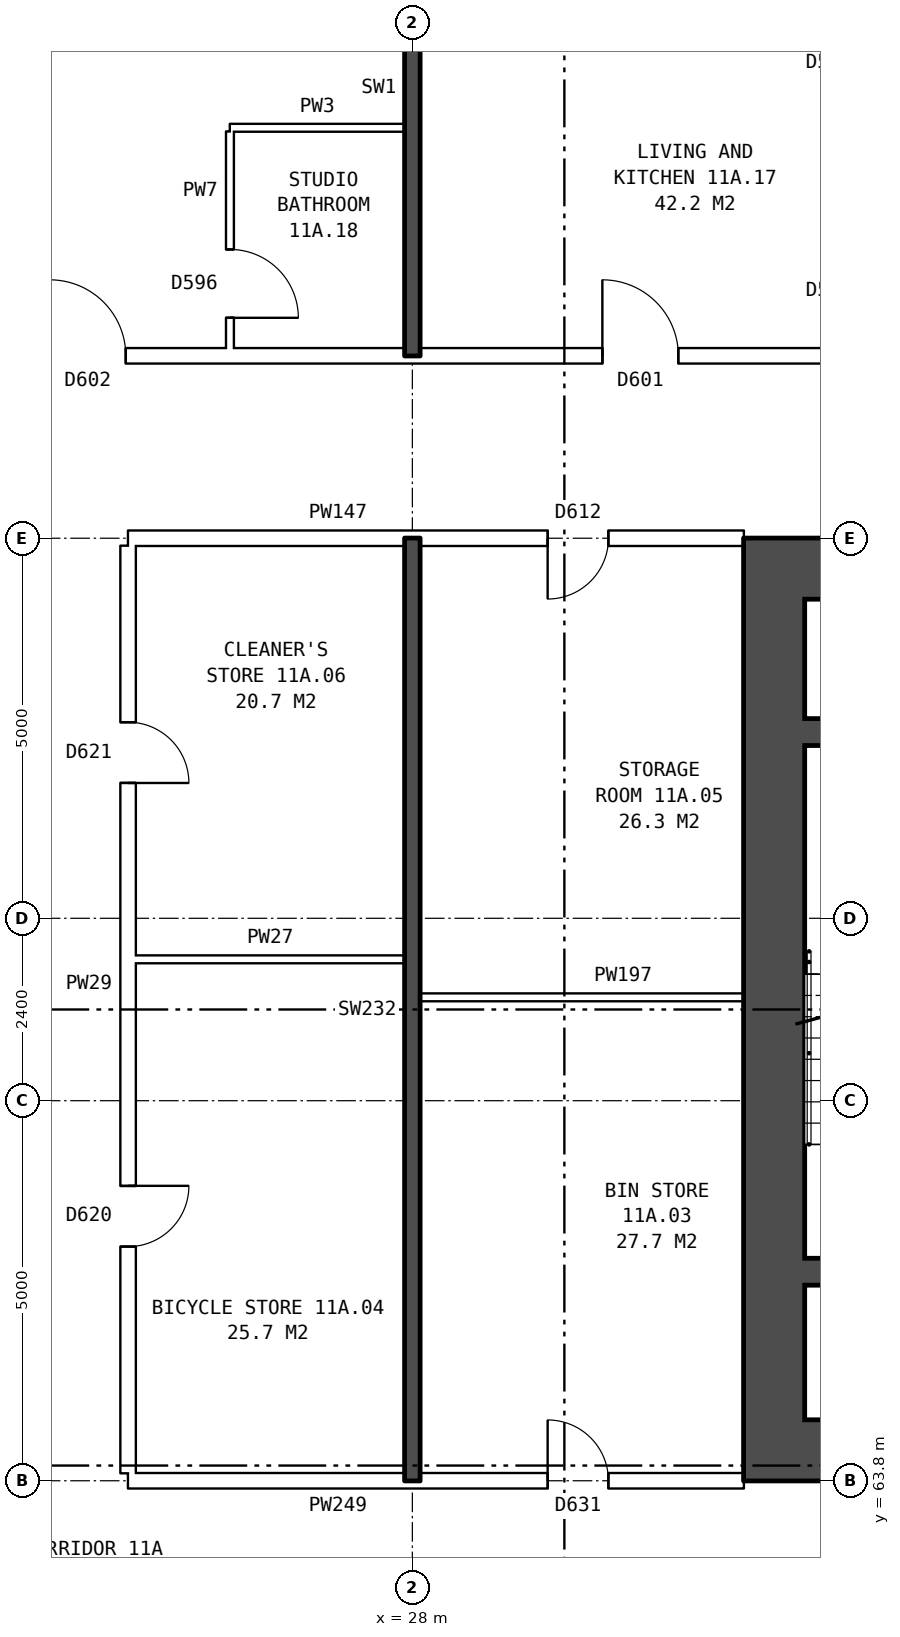
"""IFC4 building model, lengths in metres.
Left out: names, types, materials, properties, quantities, classifications, styles, units other than length and angle.
Written with IfcOpenShell. Run it as: python <this file> out.ifc"""

import sys

from ifc_helpers import new_model, si_unit, direction, frame, frame_2d, origin, place, context, subcontext, project, spatial, rectangle, extrude, element, fill, save


model = new_model("IFC4")
c1 = context("Model", 3, precision=1e-05, world=origin(), true_north=direction((0.0, 1.0)))
c2 = subcontext(c1, "Body", "Model", "MODEL_VIEW")
j1 = project(units=[si_unit("LENGTHUNIT", "METRE"), si_unit("PLANEANGLEUNIT", "RADIAN")], contexts=[c1])
p1 = place(None, origin())
s1 = spatial("IfcSite", under=j1, at=p1, CompositionType="ELEMENT")
p2 = place(p1, origin())
s2 = spatial("IfcBuilding", under=s1, at=p2, CompositionType="ELEMENT")
p3 = place(p2, frame((0.0, 0.0, 44.3)))
s3 = spatial("IfcBuildingStorey", under=s2, at=p3, CompositionType="ELEMENT", Elevation=44.3)
p4 = place(p3, frame((32.76, 75.4, 0.0), z_axis=(0.0, 0.0, 1.0), x_axis=(0.0, -1.0, 0.0)))
e1 = element("IfcWall", 1, at=p4, inside=s3, PredefinedType="SHEAR", context=c2, shape_type="SweptSolid", body=[
    extrude(rectangle(XDim=10.8, YDim=0.8, at=frame_2d((5.4, 0.0))), origin(), (0.0, 0.0, 1.0), 2.85),
])
for number, where, z_axis, x_axis in (
    (2, (41.36, 75.8, 0.0), (0.0, 0.0, 1.0), (-1.0, 0.0, 0.0)),
    (3, (41.36, 64.2, 0.0), (0.0, 0.0, 1.0), (-1.0, 0.0, 0.0)),
):
    element("IfcWall", number, at=place(p3, frame(where, z_axis=z_axis, x_axis=x_axis)), inside=s3, PredefinedType="SHEAR", context=c2, shape_type="SweptSolid", body=[
        extrude(rectangle(XDim=9.0, YDim=0.8, at=frame_2d((4.5, 0.0))), origin(), (0.0, 0.0, 1.0), 2.85),
    ])
for number, where, z_axis, x_axis in (
    (4, (36.185, 73.65, 0.0), (0.0, 0.0, 1.0), (-1.0, 0.0, 0.0)),
    (5, (36.185, 66.55, 0.0), (0.0, 0.0, 1.0), (-1.0, 0.0, 0.0)),
):
    element("IfcWall", number, at=place(p3, frame(where, z_axis=z_axis, x_axis=x_axis)), inside=s3, PredefinedType="SHEAR", context=c2, shape_type="SweptSolid", body=[
        extrude(rectangle(XDim=3.025, YDim=0.35, at=frame_2d((1.513, 0.0))), origin(), (0.0, 0.0, 1.0), 2.85),
    ])
p5 = place(p3, frame((24.26, 63.8, 0.0), z_axis=(0.0, 0.0, 1.0), x_axis=(1.0, 0.0, 0.0)))
e6 = element("IfcWall", 6, at=p5, inside=s3, PredefinedType="PARTITIONING", context=c2, shape_type="SweptSolid", body=[
    extrude(rectangle(XDim=8.1, YDim=0.2, at=frame_2d((4.05, 0.0))), origin(), (0.0, 0.0, 1.0), 2.85),
])
p6 = place(p5, frame((5.52, 0.0, 0.0)))
e7 = element("IfcOpeningElement", 7, at=p6, cuts=e6, PredefinedType="OPENING", context=c2, shape_type="SweptSolid", body=[
    extrude(rectangle(XDim=0.8, YDim=2.1, at=frame_2d((0.4, 1.05))), frame((0.0, 0.11, 0.0), z_axis=(0.0, -1.0, 0.0), x_axis=(1.0, 0.0, 0.0)), (0.0, 0.0, 1.0), 0.22),
])
p7 = place(p3, frame((28.1, 70.16, 0.0), z_axis=(0.0, 0.0, 1.0), x_axis=(1.0, 0.0, 0.0)))
e8 = element("IfcWall", 8, at=p7, inside=s3, PredefinedType="PARTITIONING", context=c2, shape_type="SweptSolid", body=[
    extrude(rectangle(XDim=4.26, YDim=0.1, at=frame_2d((2.13, 0.0))), origin(), (0.0, 0.0, 1.0), 2.85),
])
p8 = place(p3, frame((24.36, 70.66, 0.0), z_axis=(0.0, 0.0, 1.0), x_axis=(1.0, 0.0, 0.0)))
e9 = element("IfcWall", 9, at=p8, inside=s3, PredefinedType="PARTITIONING", context=c2, shape_type="SweptSolid", body=[
    extrude(rectangle(XDim=3.54, YDim=0.1, at=frame_2d((1.77, 0.0))), origin(), (0.0, 0.0, 1.0), 2.85),
])
p9 = place(p3, frame((24.26, 76.2, 0.0), z_axis=(0.0, 0.0, 1.0), x_axis=(1.0, 0.0, 0.0)))
e10 = element("IfcWall", 10, at=p9, inside=s3, PredefinedType="PARTITIONING", context=c2, shape_type="SweptSolid", body=[
    extrude(rectangle(XDim=8.1, YDim=0.2, at=frame_2d((4.05, 0.0))), origin(), (0.0, 0.0, 1.0), 2.85),
])
p10 = place(p9, frame((5.52, 0.0, 0.0)))
e11 = element("IfcOpeningElement", 11, at=p10, cuts=e10, PredefinedType="OPENING", context=c2, shape_type="SweptSolid", body=[
    extrude(rectangle(XDim=0.8, YDim=2.1, at=frame_2d((0.4, 1.05))), frame((0.0, 0.11, 0.0), z_axis=(0.0, -1.0, 0.0), x_axis=(1.0, 0.0, 0.0)), (0.0, 0.0, 1.0), 0.22),
])
p11 = place(p3, frame((21.86, 78.6, 0.0), z_axis=(0.0, 0.0, 1.0), x_axis=(1.0, 0.0, 0.0)))
e12 = element("IfcWall", 12, at=p11, inside=s3, PredefinedType="PARTITIONING", context=c2, shape_type="SweptSolid", body=[
    extrude(rectangle(XDim=24.04, YDim=0.2, at=frame_2d((12.02, 0.0))), origin(), (0.0, 0.0, 1.0), 2.85),
])
p12 = place(p11, frame((20.59, 0.0, 0.0)))
e13 = element("IfcOpeningElement", 13, at=p12, cuts=e12, PredefinedType="OPENING", context=c2, shape_type="SweptSolid", body=[
    extrude(rectangle(XDim=1.0, YDim=2.1, at=frame_2d((0.5, 1.05))), frame((0.0, 0.11, 0.0), z_axis=(0.0, -1.0, 0.0), x_axis=(1.0, 0.0, 0.0)), (0.0, 0.0, 1.0), 0.22),
])
p13 = place(p11, frame((8.64, 0.0, 0.0)))
e14 = element("IfcOpeningElement", 14, at=p13, cuts=e12, PredefinedType="OPENING", context=c2, shape_type="SweptSolid", body=[
    extrude(rectangle(XDim=1.0, YDim=2.1, at=frame_2d((0.5, 1.05))), frame((0.0, 0.11, 0.0), z_axis=(0.0, -1.0, 0.0), x_axis=(1.0, 0.0, 0.0)), (0.0, 0.0, 1.0), 0.22),
])
p14 = place(p11, frame((1.37, 0.0, 0.0)))
e15 = element("IfcOpeningElement", 15, at=p14, cuts=e12, PredefinedType="OPENING", context=c2, shape_type="SweptSolid", body=[
    extrude(rectangle(XDim=1.0, YDim=2.1, at=frame_2d((0.5, 1.05))), frame((0.0, 0.11, 0.0), z_axis=(0.0, -1.0, 0.0), x_axis=(1.0, 0.0, 0.0)), (0.0, 0.0, 1.0), 0.22),
])
p15 = place(p3, frame((25.6, 81.6, 0.0), z_axis=(0.0, 0.0, 1.0), x_axis=(1.0, 0.0, 0.0)))
e16 = element("IfcWall", 16, at=p15, inside=s3, PredefinedType="PARTITIONING", context=c2, shape_type="SweptSolid", body=[
    extrude(rectangle(XDim=2.3, YDim=0.1, at=frame_2d((1.15, 0.0))), origin(), (0.0, 0.0, 1.0), 2.85),
])
p16 = place(p3, frame((24.26, 63.9, 0.0), z_axis=(0.0, 0.0, 1.0), x_axis=(0.0, 1.0, 0.0)))
e17 = element("IfcWall", 17, at=p16, inside=s3, PredefinedType="PARTITIONING", context=c2, shape_type="SweptSolid", body=[
    extrude(rectangle(XDim=12.2, YDim=0.2, at=frame_2d((6.1, 0.0))), origin(), (0.0, 0.0, 1.0), 2.85),
])
p17 = place(p16, frame((2.98, 0.0, 0.0)))
e18 = element("IfcOpeningElement", 18, at=p17, cuts=e17, PredefinedType="OPENING", context=c2, shape_type="SweptSolid", body=[
    extrude(rectangle(XDim=0.8, YDim=2.1, at=frame_2d((0.4, 1.05))), frame((0.0, 0.11, 0.0), z_axis=(0.0, -1.0, 0.0), x_axis=(1.0, 0.0, 0.0)), (0.0, 0.0, 1.0), 0.22),
])
p18 = place(p16, frame((9.08, 0.0, 0.0)))
e19 = element("IfcOpeningElement", 19, at=p18, cuts=e17, PredefinedType="OPENING", context=c2, shape_type="SweptSolid", body=[
    extrude(rectangle(XDim=0.8, YDim=2.1, at=frame_2d((0.4, 1.05))), frame((0.0, 0.11, 0.0), z_axis=(0.0, -1.0, 0.0), x_axis=(1.0, 0.0, 0.0)), (0.0, 0.0, 1.0), 0.22),
])
p19 = place(p3, frame((25.6, 78.7, 0.0), z_axis=(0.0, 0.0, 1.0), x_axis=(0.0, 1.0, 0.0)))
e20 = element("IfcWall", 20, at=p19, inside=s3, PredefinedType="PARTITIONING", context=c2, shape_type="SweptSolid", body=[
    extrude(rectangle(XDim=2.85, YDim=0.1, at=frame_2d((1.425, 0.0))), origin(), (0.0, 0.0, 1.0), 2.85),
])
p20 = place(p19, frame((0.4, 0.0, 0.0)))
e21 = element("IfcOpeningElement", 21, at=p20, cuts=e20, PredefinedType="OPENING", context=c2, shape_type="SweptSolid", body=[
    extrude(rectangle(XDim=0.9, YDim=2.1, at=frame_2d((0.45, 1.05))), frame((0.0, 0.06, 0.0), z_axis=(0.0, -1.0, 0.0), x_axis=(1.0, 0.0, 0.0)), (0.0, 0.0, 1.0), 0.12),
])
p21 = place(p3, frame((28.0, 63.8, 0.0), z_axis=(0.0, 0.0, 1.0), x_axis=(0.0, 1.0, 0.0)))
e22 = element("IfcWall", 22, at=p21, inside=s3, PredefinedType="SOLIDWALL", context=c2, shape_type="SweptSolid", body=[
    extrude(rectangle(XDim=12.4, YDim=0.2, at=frame_2d((6.2, 0.0))), origin(), (0.0, 0.0, 1.0), 2.85),
])
p22 = place(p3, frame((28.0, 78.6, 0.0), z_axis=(0.0, 0.0, 1.0), x_axis=(0.0, 1.0, 0.0)))
e23 = element("IfcWall", 23, at=p22, inside=s3, PredefinedType="SOLIDWALL", context=c2, shape_type="SweptSolid", body=[
    extrude(rectangle(XDim=7.04, YDim=0.2, at=frame_2d((3.52, 0.0))), origin(), (0.0, 0.0, 1.0), 2.85),
])
p23 = place(p6, origin())
e24 = element("IfcDoor", 24, at=p23, inside=s3, OperationType="SINGLE_SWING_LEFT", PredefinedType="DOOR", context=c2, shape_type="SweptSolid", body=[
    extrude(rectangle(XDim=0.8, YDim=2.1, at=frame_2d((0.4, 1.05))), frame((0.0, 0.025, 0.0), z_axis=(0.0, -1.0, 0.0), x_axis=(1.0, 0.0, 0.0)), (0.0, 0.0, 1.0), 0.05),
])
fill(e7, e24)
p24 = place(p17, frame((0.8, 0.0, 0.0), z_axis=(0.0, 0.0, 1.0), x_axis=(-1.0, 0.0, 0.0)))
e25 = element("IfcDoor", 25, at=p24, inside=s3, OperationType="SINGLE_SWING_LEFT", PredefinedType="DOOR", context=c2, shape_type="SweptSolid", body=[
    extrude(rectangle(XDim=0.8, YDim=2.1, at=frame_2d((0.4, 1.05))), frame((0.0, 0.025, 0.0), z_axis=(0.0, -1.0, 0.0), x_axis=(1.0, 0.0, 0.0)), (0.0, 0.0, 1.0), 0.05),
])
fill(e18, e25)
p25 = place(p10, frame((0.8, 0.0, 0.0), z_axis=(0.0, 0.0, 1.0), x_axis=(-1.0, 0.0, 0.0)))
e26 = element("IfcDoor", 26, at=p25, inside=s3, OperationType="SINGLE_SWING_RIGHT", PredefinedType="DOOR", context=c2, shape_type="SweptSolid", body=[
    extrude(rectangle(XDim=0.8, YDim=2.1, at=frame_2d((0.4, 1.05))), frame((0.0, 0.025, 0.0), z_axis=(0.0, -1.0, 0.0), x_axis=(1.0, 0.0, 0.0)), (0.0, 0.0, 1.0), 0.05),
])
fill(e11, e26)
p26 = place(p18, frame((0.8, 0.0, 0.0), z_axis=(0.0, 0.0, 1.0), x_axis=(-1.0, 0.0, 0.0)))
e27 = element("IfcDoor", 27, at=p26, inside=s3, OperationType="SINGLE_SWING_RIGHT", PredefinedType="DOOR", context=c2, shape_type="SweptSolid", body=[
    extrude(rectangle(XDim=0.8, YDim=2.1, at=frame_2d((0.4, 1.05))), frame((0.0, 0.025, 0.0), z_axis=(0.0, -1.0, 0.0), x_axis=(1.0, 0.0, 0.0)), (0.0, 0.0, 1.0), 0.05),
])
fill(e19, e27)
p27 = place(p13, origin())
e28 = element("IfcDoor", 28, at=p27, inside=s3, OperationType="SINGLE_SWING_LEFT", PredefinedType="DOOR", context=c2, shape_type="SweptSolid", body=[
    extrude(rectangle(XDim=1.0, YDim=2.1, at=frame_2d((0.5, 1.05))), frame((0.0, 0.025, 0.0), z_axis=(0.0, -1.0, 0.0), x_axis=(1.0, 0.0, 0.0)), (0.0, 0.0, 1.0), 0.05),
])
fill(e14, e28)
p28 = place(p14, origin())
e29 = element("IfcDoor", 29, at=p28, inside=s3, OperationType="SINGLE_SWING_LEFT", PredefinedType="DOOR", context=c2, shape_type="SweptSolid", body=[
    extrude(rectangle(XDim=1.0, YDim=2.1, at=frame_2d((0.5, 1.05))), frame((0.0, 0.025, 0.0), z_axis=(0.0, -1.0, 0.0), x_axis=(1.0, 0.0, 0.0)), (0.0, 0.0, 1.0), 0.05),
])
fill(e15, e29)
p29 = place(p20, frame((0.9, 0.0, 0.0), z_axis=(0.0, 0.0, 1.0), x_axis=(-1.0, 0.0, 0.0)))
e30 = element("IfcDoor", 30, at=p29, inside=s3, OperationType="SINGLE_SWING_RIGHT", PredefinedType="DOOR", context=c2, shape_type="SweptSolid", body=[
    extrude(rectangle(XDim=0.9, YDim=2.1, at=frame_2d((0.45, 1.05))), frame((0.0, 0.025, 0.0), z_axis=(0.0, -1.0, 0.0), x_axis=(1.0, 0.0, 0.0)), (0.0, 0.0, 1.0), 0.05),
])
fill(e21, e30)
save(model, sys.argv[1])
